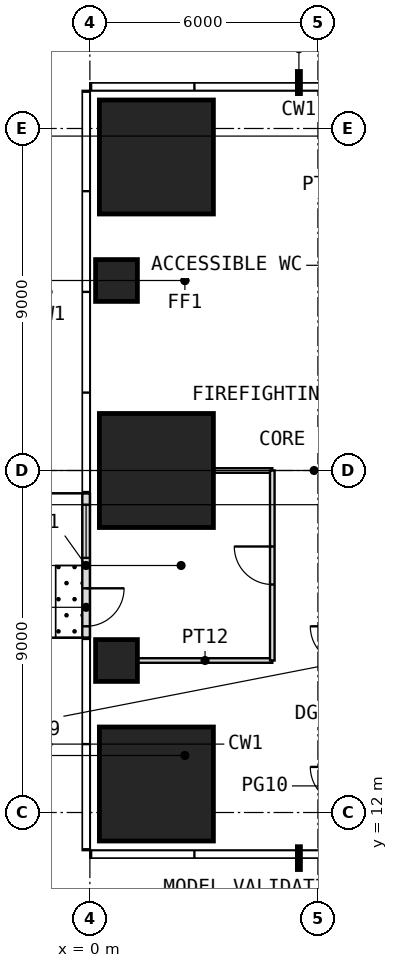
"""IFC4 building model, lengths in metres.
Left out: names, types, materials, properties, quantities, classifications, styles, units other than length and angle.
Written with IfcOpenShell. Run it as: python <this file> out.ifc"""

import sys

from ifc_helpers import new_model, si_unit, direction, frame, frame_2d, origin, origin_2d, place, context, subcontext, project, spatial, rectangle, extrude, element, fill, save


model = new_model("IFC4")
c1 = context("Model", 3, precision=1e-05, world=origin(), true_north=direction((0.0, 1.0)))
c2 = subcontext(c1, "Body", "Model", "MODEL_VIEW")
j1 = project(units=[si_unit("LENGTHUNIT", "METRE"), si_unit("PLANEANGLEUNIT", "RADIAN")], contexts=[c1])
p1 = place(None, origin())
s1 = spatial("IfcSite", under=j1, at=p1, CompositionType="ELEMENT")
p2 = place(p1, origin())
s2 = spatial("IfcBuilding", under=s1, at=p2, CompositionType="ELEMENT")
p3 = place(p2, frame((0.0, 0.0, 144.5)))
s3 = spatial("IfcBuildingStorey", under=s2, at=p3, CompositionType="ELEMENT", Elevation=144.5)
p4 = place(p3, frame((1.75, 12.75, 0.0), z_axis=(0.0, 0.0, 1.0), x_axis=(1.0, 0.0, 0.0)))
e1 = element("IfcColumn", 1, at=p4, inside=s3, PredefinedType="COLUMN", context=c2, shape_type="SweptSolid", body=[
    extrude(rectangle(XDim=3.0, YDim=3.0, at=origin_2d()), origin(), (0.0, 0.0, 1.0), 4.0),
])
p5 = place(p3, frame((0.7, 16.0, 0.0), z_axis=(0.0, 0.0, 1.0), x_axis=(1.0, 0.0, 0.0)))
e2 = element("IfcColumn", 2, at=p5, inside=s3, PredefinedType="COLUMN", context=c2, shape_type="SweptSolid", body=[
    extrude(rectangle(XDim=1.1, YDim=1.1, at=origin_2d()), origin(), (0.0, 0.0, 1.0), 4.0),
])
p6 = place(p3, frame((1.75, 21.0, 0.0), z_axis=(0.0, 0.0, 1.0), x_axis=(1.0, 0.0, 0.0)))
e3 = element("IfcColumn", 3, at=p6, inside=s3, PredefinedType="COLUMN", context=c2, shape_type="SweptSolid", body=[
    extrude(rectangle(XDim=3.0, YDim=3.0, at=origin_2d()), origin(), (0.0, 0.0, 1.0), 4.0),
])
p7 = place(p3, frame((0.7, 26.0, 0.0), z_axis=(0.0, 0.0, 1.0), x_axis=(1.0, 0.0, 0.0)))
e4 = element("IfcColumn", 4, at=p7, inside=s3, PredefinedType="COLUMN", context=c2, shape_type="SweptSolid", body=[
    extrude(rectangle(XDim=1.1, YDim=1.1, at=origin_2d()), origin(), (0.0, 0.0, 1.0), 4.0),
])
p8 = place(p3, frame((1.75, 29.25, 0.0), z_axis=(0.0, 0.0, 1.0), x_axis=(1.0, 0.0, 0.0)))
e5 = element("IfcColumn", 5, at=p8, inside=s3, PredefinedType="COLUMN", context=c2, shape_type="SweptSolid", body=[
    extrude(rectangle(XDim=3.0, YDim=3.0, at=origin_2d()), origin(), (0.0, 0.0, 1.0), 4.0),
])
p9 = place(p3, frame((-0.1, 20.4, 0.0), z_axis=(0.0, 0.0, 1.0), x_axis=(0.0, -1.0, 0.0)))
e6 = element("IfcWall", 6, at=p9, inside=s3, PredefinedType="USERDEFINED", context=c2, shape_type="SweptSolid", body=[
    extrude(rectangle(XDim=3.8, YDim=0.2, at=frame_2d((1.9, 0.0))), origin(), (0.0, 0.0, 1.0), 3.75),
])
p10 = place(p9, frame((2.5, 0.0, 0.0)))
e7 = element("IfcOpeningElement", 7, at=p10, cuts=e6, PredefinedType="OPENING", context=c2, shape_type="SweptSolid", body=[
    extrude(rectangle(XDim=1.0, YDim=2.4, at=frame_2d((0.5, 1.2))), frame((0.0, 0.11, 0.0), z_axis=(0.0, -1.0, 0.0), x_axis=(1.0, 0.0, 0.0)), (0.0, 0.0, 1.0), 0.22),
])
p11 = place(p9, frame((0.3, 0.0, 0.3)))
e8 = element("IfcOpeningElement", 8, at=p11, cuts=e6, PredefinedType="OPENING", context=c2, shape_type="SweptSolid", body=[
    extrude(rectangle(XDim=1.4, YDim=2.7, at=frame_2d((0.7, 1.35))), frame((0.0, 0.11, 0.0), z_axis=(0.0, -1.0, 0.0), x_axis=(1.0, 0.0, 0.0)), (0.0, 0.0, 1.0), 0.22),
])
p12 = place(p3, frame((1.26, 16.0, 0.0), z_axis=(0.0, 0.0, 1.0), x_axis=(1.0, 0.0, 0.0)))
e9 = element("IfcWall", 9, at=p12, inside=s3, PredefinedType="PARTITIONING", context=c2, shape_type="SweptSolid", body=[
    extrude(rectangle(XDim=3.54, YDim=0.12, at=frame_2d((1.77, 0.0))), origin(), (0.0, 0.0, 1.0), 3.75),
])
p13 = place(p3, frame((3.26, 21.0, 0.0), z_axis=(0.0, 0.0, 1.0), x_axis=(1.0, 0.0, 0.0)))
e10 = element("IfcWall", 10, at=p13, inside=s3, PredefinedType="PARTITIONING", context=c2, shape_type="SweptSolid", body=[
    extrude(rectangle(XDim=1.54, YDim=0.12, at=frame_2d((0.77, 0.0))), origin(), (0.0, 0.0, 1.0), 3.75),
])
p14 = place(p3, frame((4.8, 16.0, 0.0), z_axis=(0.0, 0.0, 1.0), x_axis=(0.0, 1.0, 0.0)))
e11 = element("IfcWall", 11, at=p14, inside=s3, PredefinedType="PARTITIONING", context=c2, shape_type="SweptSolid", body=[
    extrude(rectangle(XDim=5.0, YDim=0.12, at=frame_2d((2.5, 0.0))), origin(), (0.0, 0.0, 1.0), 3.75),
])
p15 = place(p14, frame((2.0, 0.0, 0.0)))
e12 = element("IfcOpeningElement", 12, at=p15, cuts=e11, PredefinedType="OPENING", context=c2, shape_type="SweptSolid", body=[
    extrude(rectangle(XDim=1.0, YDim=2.2, at=frame_2d((0.5, 1.1))), frame((0.0, 0.07, 0.0), z_axis=(0.0, -1.0, 0.0), x_axis=(1.0, 0.0, 0.0)), (0.0, 0.0, 1.0), 0.14),
])
p16 = place(p10, origin())
e13 = element("IfcDoor", 13, at=p16, inside=s3, OperationType="SINGLE_SWING_LEFT", PredefinedType="DOOR", context=c2, shape_type="SweptSolid", body=[
    extrude(rectangle(XDim=1.0, YDim=2.4, at=frame_2d((0.5, 1.2))), frame((0.0, 0.025, 0.0), z_axis=(0.0, -1.0, 0.0), x_axis=(1.0, 0.0, 0.0)), (0.0, 0.0, 1.0), 0.05),
])
fill(e7, e13)
p17 = place(p11, origin())
e14 = element("IfcWindow", 14, at=p17, inside=s3, PartitioningType="SINGLE_PANEL", PredefinedType="WINDOW", context=c2, shape_type="SweptSolid", body=[
    extrude(rectangle(XDim=1.4, YDim=2.7, at=frame_2d((0.7, 1.35))), frame((0.0, 0.03, 0.0), z_axis=(0.0, -1.0, 0.0), x_axis=(1.0, 0.0, 0.0)), (0.0, 0.0, 1.0), 0.06),
])
fill(e8, e14)
p18 = place(p15, origin())
e15 = element("IfcDoor", 15, at=p18, inside=s3, OperationType="SINGLE_SWING_RIGHT", PredefinedType="DOOR", context=c2, shape_type="SweptSolid", body=[
    extrude(rectangle(XDim=1.0, YDim=2.2, at=frame_2d((0.5, 1.1))), frame((0.0, 0.025, 0.0), z_axis=(0.0, -1.0, 0.0), x_axis=(1.0, 0.0, 0.0)), (0.0, 0.0, 1.0), 0.05),
])
fill(e12, e15)
save(model, sys.argv[1])
